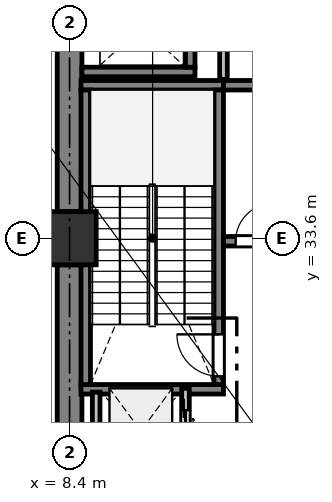
"""IFC4 building model, lengths in metres.
Left out: names, types, materials, properties, quantities, classifications, styles, units other than length and angle.
Written with IfcOpenShell. Run it as: python <this file> out.ifc"""

import sys

from ifc_helpers import new_model, si_unit, direction, frame, frame_2d, origin, origin_2d, place, context, subcontext, project, spatial, rectangle, extrude, element, fill, save


model = new_model("IFC4")
c1 = context("Model", 3, precision=1e-05, world=origin(), true_north=direction((0.0, 1.0)))
c2 = subcontext(c1, "Body", "Model", "MODEL_VIEW")
j1 = project(units=[si_unit("LENGTHUNIT", "METRE"), si_unit("PLANEANGLEUNIT", "RADIAN")], contexts=[c1])
p1 = place(None, origin())
s1 = spatial("IfcSite", under=j1, at=p1, CompositionType="ELEMENT")
p2 = place(p1, origin())
s2 = spatial("IfcBuilding", under=s1, at=p2, CompositionType="ELEMENT")
p3 = place(p2, frame((0.0, 0.0, 79.4)))
s3 = spatial("IfcBuildingStorey", under=s2, at=p3, CompositionType="ELEMENT", Elevation=79.4)
p4 = place(p3, frame((8.4, 33.6, 0.0), z_axis=(0.0, 0.0, 1.0), x_axis=(1.0, 0.0, 0.0)))
e1 = element("IfcColumn", 1, at=p4, inside=s3, PredefinedType="COLUMN", context=c2, shape_type="SweptSolid", body=[
    extrude(rectangle(XDim=1.4, YDim=1.4, at=origin_2d()), origin(), (0.0, 0.0, 1.0), 5.0),
])
for number, where, z_axis, x_axis in (
    (2, (8.4, 25.9, 0.0), (0.0, 0.0, 1.0), (0.0, 1.0, 0.0)),
    (3, (8.4, 34.3, 0.0), (0.0, 0.0, 1.0), (0.0, 1.0, 0.0)),
):
    element("IfcWall", number, at=place(p3, frame(where, z_axis=z_axis, x_axis=x_axis)), inside=s3, PredefinedType="SHEAR", context=c2, shape_type="SweptSolid", body=[
        extrude(rectangle(XDim=7.0, YDim=0.65, at=frame_2d((3.5, 0.0))), origin(), (0.0, 0.0, 1.0), 4.725),
    ])
for number, where, z_axis, x_axis in (
    (4, (12.45, 29.625, 0.0), (0.0, 0.0, 1.0), (-1.0, 0.0, 0.0)),
    (5, (12.45, 37.625, 0.0), (0.0, 0.0, 1.0), (-1.0, 0.0, 0.0)),
):
    element("IfcWall", number, at=place(p3, frame(where, z_axis=z_axis, x_axis=x_axis)), inside=s3, PredefinedType="SHEAR", context=c2, shape_type="SweptSolid", body=[
        extrude(rectangle(XDim=3.75, YDim=0.25, at=frame_2d((1.875, 0.0))), origin(), (0.0, 0.0, 1.0), 4.725),
    ])
p5 = place(p3, frame((12.325, 29.75, 0.0), z_axis=(0.0, 0.0, 1.0), x_axis=(0.0, 1.0, 0.0)))
e6 = element("IfcWall", 6, at=p5, inside=s3, PredefinedType="SHEAR", context=c2, shape_type="SweptSolid", body=[
    extrude(rectangle(XDim=7.75, YDim=0.25, at=frame_2d((3.875, 0.0))), origin(), (0.0, 0.0, 1.0), 4.725),
])
p6 = place(p5, frame((0.22, 0.0, 0.0)))
e7 = element("IfcOpeningElement", 7, at=p6, cuts=e6, PredefinedType="OPENING", context=c2, shape_type="SweptSolid", body=[
    extrude(rectangle(XDim=1.1, YDim=2.15, at=frame_2d((0.55, 1.075))), frame((0.0, 0.135, 0.0), z_axis=(0.0, -1.0, 0.0), x_axis=(1.0, 0.0, 0.0)), (0.0, 0.0, 1.0), 0.27),
])
p7 = place(p3, frame((8.825, 29.75, 0.0), z_axis=(0.0, 0.0, 1.0), x_axis=(0.0, 1.0, 0.0)))
e8 = element("IfcWall", 8, at=p7, inside=s3, PredefinedType="SHEAR", context=c2, shape_type="SweptSolid", body=[
    extrude(rectangle(XDim=7.75, YDim=0.25, at=frame_2d((3.875, 0.0))), origin(), (0.0, 0.0, 1.0), 4.725),
])
p8 = place(p3, frame((8.725, 37.975, 0.0), z_axis=(0.0, 0.0, 1.0), x_axis=(1.0, 0.0, 0.0)))
e9 = element("IfcWall", 9, at=p8, inside=s3, PredefinedType="SHEAR", context=c2, shape_type="SweptSolid", body=[
    extrude(rectangle(XDim=2.975, YDim=0.25, at=frame_2d((1.487, 0.0))), origin(), (0.0, 0.0, 1.0), 4.725),
])
p9 = place(p3, frame((11.575, 38.1, 0.0), z_axis=(0.0, 0.0, 1.0), x_axis=(0.0, 1.0, 0.0)))
e10 = element("IfcWall", 10, at=p9, inside=s3, PredefinedType="SHEAR", context=c2, shape_type="SweptSolid", body=[
    extrude(rectangle(XDim=2.45, YDim=0.25, at=frame_2d((1.225, 0.0))), origin(), (0.0, 0.0, 1.0), 4.725),
])
p10 = place(p3, frame((12.45, 33.52, 0.0), z_axis=(0.0, 0.0, 1.0), x_axis=(1.0, 0.0, 0.0)))
e11 = element("IfcWall", 11, at=p10, inside=s3, PredefinedType="SHEAR", context=c2, shape_type="SweptSolid", body=[
    extrude(rectangle(XDim=3.65, YDim=0.25, at=frame_2d((1.825, 0.0))), origin(), (0.0, 0.0, 1.0), 4.725),
])
p11 = place(p10, frame((0.32, 0.0, 0.0)))
e12 = element("IfcOpeningElement", 12, at=p11, cuts=e11, PredefinedType="OPENING", context=c2, shape_type="SweptSolid", body=[
    extrude(rectangle(XDim=1.0, YDim=2.15, at=frame_2d((0.5, 1.075))), frame((0.0, 0.135, 0.0), z_axis=(0.0, -1.0, 0.0), x_axis=(1.0, 0.0, 0.0)), (0.0, 0.0, 1.0), 0.27),
])
p12 = place(p3, frame((12.45, 37.625, 0.0), z_axis=(0.0, 0.0, 1.0), x_axis=(1.0, 0.0, 0.0)))
e13 = element("IfcWall", 13, at=p12, inside=s3, PredefinedType="SHEAR", context=c2, shape_type="SweptSolid", body=[
    extrude(rectangle(XDim=4.025, YDim=0.25, at=frame_2d((2.013, 0.0))), origin(), (0.0, 0.0, 1.0), 4.725),
])
p13 = place(p12, frame((1.587, 0.0, 0.0)))
e14 = element("IfcOpeningElement", 14, at=p13, cuts=e13, PredefinedType="OPENING", context=c2, shape_type="SweptSolid", body=[
    extrude(rectangle(XDim=0.85, YDim=2.15, at=frame_2d((0.425, 1.075))), frame((0.0, 0.135, 0.0), z_axis=(0.0, -1.0, 0.0), x_axis=(1.0, 0.0, 0.0)), (0.0, 0.0, 1.0), 0.27),
])
p14 = place(p3, frame((11.45, 27.4, 0.0), z_axis=(0.0, 0.0, 1.0), x_axis=(0.0, 1.0, 0.0)))
e15 = element("IfcWall", 15, at=p14, inside=s3, PredefinedType="PARTITIONING", context=c2, shape_type="SweptSolid", body=[
    extrude(rectangle(XDim=2.25, YDim=0.2, at=frame_2d((1.125, 0.0))), origin(), (0.0, 0.0, 1.0), 4.725),
])
p15 = place(p14, frame((0.575, 0.0, 0.0)))
e16 = element("IfcOpeningElement", 16, at=p15, cuts=e15, PredefinedType="OPENING", context=c2, shape_type="SweptSolid", body=[
    extrude(rectangle(XDim=1.1, YDim=2.2, at=frame_2d((0.55, 1.1))), frame((0.0, 0.11, 0.0), z_axis=(0.0, -1.0, 0.0), x_axis=(1.0, 0.0, 0.0)), (0.0, 0.0, 1.0), 0.22),
])
p16 = place(p3, frame((9.1, 27.5, 0.0), z_axis=(0.0, 0.0, 1.0), x_axis=(0.0, 1.0, 0.0)))
e17 = element("IfcWall", 17, at=p16, inside=s3, PredefinedType="PARTITIONING", context=c2, shape_type="SweptSolid", body=[
    extrude(rectangle(XDim=2.05, YDim=0.2, at=frame_2d((1.025, 0.0))), origin(), (0.0, 0.0, 1.0), 4.725),
])
p17 = place(p3, frame((12.45, 40.546, 0.0), z_axis=(0.0, 0.0, 1.0), x_axis=(0.0, -1.0, 0.0)))
e18 = element("IfcWall", 18, at=p17, inside=s3, PredefinedType="PARTITIONING", context=c2, shape_type="SweptSolid", body=[
    extrude(rectangle(XDim=2.766, YDim=0.2, at=frame_2d((1.383, 0.0))), origin(), (0.0, 0.0, 1.0), 3.625),
])
p18 = place(p6, origin())
e19 = element("IfcDoor", 19, at=p18, inside=s3, OperationType="SINGLE_SWING_RIGHT", PredefinedType="DOOR", context=c2, shape_type="SweptSolid", body=[
    extrude(rectangle(XDim=1.1, YDim=2.15, at=frame_2d((0.55, 1.075))), frame((0.0, 0.025, 0.0), z_axis=(0.0, -1.0, 0.0), x_axis=(1.0, 0.0, 0.0)), (0.0, 0.0, 1.0), 0.05),
])
fill(e7, e19)
p19 = place(p11, origin())
e20 = element("IfcDoor", 20, at=p19, inside=s3, OperationType="SINGLE_SWING_RIGHT", PredefinedType="DOOR", context=c2, shape_type="SweptSolid", body=[
    extrude(rectangle(XDim=1.0, YDim=2.15, at=frame_2d((0.5, 1.075))), frame((0.0, 0.025, 0.0), z_axis=(0.0, -1.0, 0.0), x_axis=(1.0, 0.0, 0.0)), (0.0, 0.0, 1.0), 0.05),
])
fill(e12, e20)
p20 = place(p15, origin())
e21 = element("IfcDoor", 21, at=p20, inside=s3, OperationType="DOUBLE_DOOR_SLIDING", PredefinedType="DOOR", context=c2, shape_type="SweptSolid", body=[
    extrude(rectangle(XDim=1.1, YDim=2.2, at=frame_2d((0.55, 1.1))), frame((0.0, 0.025, 0.0), z_axis=(0.0, -1.0, 0.0), x_axis=(1.0, 0.0, 0.0)), (0.0, 0.0, 1.0), 0.05),
])
fill(e16, e21)
save(model, sys.argv[1])
